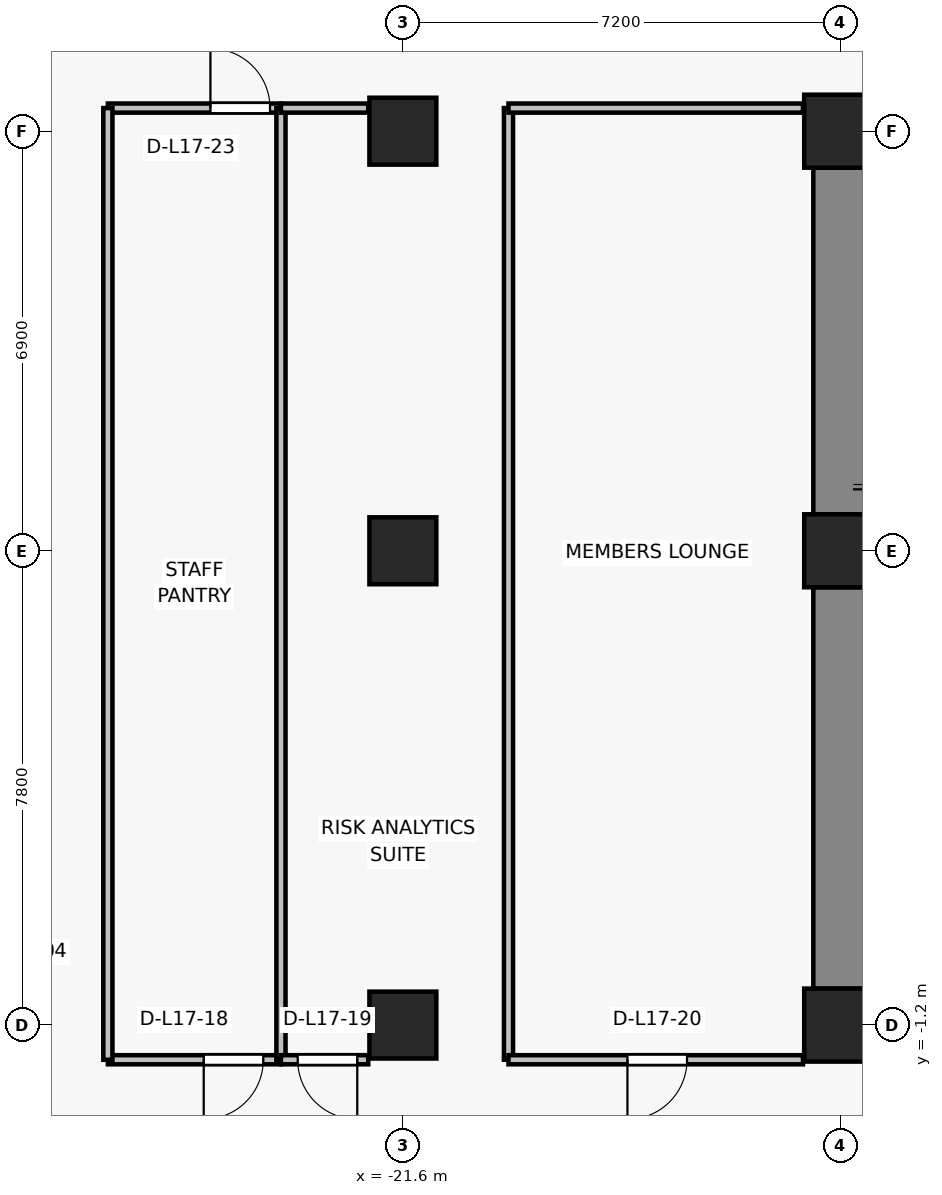
"""IFC4 building model, lengths in metres.
Left out: names, types, materials, properties, quantities, classifications, styles, units other than length and angle.
Written with IfcOpenShell. Run it as: python <this file> out.ifc"""

import sys

from ifc_helpers import new_model, si_unit, direction, frame, frame_2d, origin, origin_2d, place, context, subcontext, project, spatial, rectangle, extrude, source, transform, mapped, element, fill, save


model = new_model("IFC4")
c1 = context("Model", 3, precision=1e-05, world=origin(), true_north=direction((0.0, 1.0)))
c2 = subcontext(c1, "Body", "Model", "MODEL_VIEW")
j1 = project(units=[si_unit("LENGTHUNIT", "METRE"), si_unit("PLANEANGLEUNIT", "RADIAN")], contexts=[c1])
p1 = place(None, origin())
s1 = spatial("IfcSite", under=j1, at=p1, CompositionType="ELEMENT")
p2 = place(p1, origin())
s2 = spatial("IfcBuilding", under=s1, at=p2, CompositionType="ELEMENT")
p3 = place(p2, frame((0.0, 0.0, 63.7)))
s3 = spatial("IfcBuildingStorey", under=s2, at=p3, CompositionType="ELEMENT", Elevation=63.7)
for number, where, z_axis, x_axis in (
    (1, (-14.4, -1.2, 0.0), (0.0, 0.0, 1.0), (1.0, 0.0, 0.0)),
    (2, (-14.4, 6.6, 0.0), (0.0, 0.0, 1.0), (1.0, 0.0, 0.0)),
    (3, (-14.4, 13.5, 0.0), (0.0, 0.0, 1.0), (1.0, 0.0, 0.0)),
):
    element("IfcColumn", number, at=place(p3, frame(where, z_axis=z_axis, x_axis=x_axis)), inside=s3, PredefinedType="COLUMN", context=c2, shape_type="SweptSolid", body=[
        extrude(rectangle(XDim=1.2, YDim=1.2, at=origin_2d()), origin(), (0.0, 0.0, 1.0), 3.3),
    ])
for number, where, z_axis, x_axis in (
    (4, (-21.6, -1.2, 0.0), (0.0, 0.0, 1.0), (1.0, 0.0, 0.0)),
    (5, (-21.6, 6.6, 0.0), (0.0, 0.0, 1.0), (1.0, 0.0, 0.0)),
    (6, (-21.6, 13.5, 0.0), (0.0, 0.0, 1.0), (1.0, 0.0, 0.0)),
):
    element("IfcColumn", number, at=place(p3, frame(where, z_axis=z_axis, x_axis=x_axis)), inside=s3, PredefinedType="COLUMN", context=c2, shape_type="SweptSolid", body=[
        extrude(rectangle(XDim=1.1, YDim=1.1, at=origin_2d()), origin(), (0.0, 0.0, 1.0), 3.3),
    ])
p4 = place(p3, frame((-14.4, -0.6, 0.0), z_axis=(0.0, 0.0, 1.0), x_axis=(0.0, 1.0, 0.0)))
e7 = element("IfcWall", 7, at=p4, inside=s3, PredefinedType="SHEAR", context=c2, shape_type="SweptSolid", body=[
    extrude(rectangle(XDim=6.6, YDim=0.9, at=frame_2d((3.3, 0.0))), origin(), (0.0, 0.0, 1.0), 3.075),
])
p5 = place(p3, frame((-14.4, 7.2, 0.0), z_axis=(0.0, 0.0, 1.0), x_axis=(0.0, 1.0, 0.0)))
e8 = element("IfcWall", 8, at=p5, inside=s3, PredefinedType="SHEAR", context=c2, shape_type="SweptSolid", body=[
    extrude(rectangle(XDim=5.7, YDim=0.9, at=frame_2d((2.85, 0.0))), origin(), (0.0, 0.0, 1.0), 3.075),
])
p6 = place(p3, frame((-23.605, -1.77, 0.0), z_axis=(0.0, 0.0, 1.0), x_axis=(-1.0, 0.0, 0.0)))
e9 = element("IfcWall", 9, at=p6, inside=s3, PredefinedType="PARTITIONING", context=c2, shape_type="SweptSolid", body=[
    extrude(rectangle(XDim=2.846, YDim=0.15, at=frame_2d((1.423, 0.0))), origin(), (0.0, 0.0, 1.0), 3.075),
])
p7 = place(p6, frame((0.29, 0.0, 0.0)))
e10 = element("IfcOpeningElement", 10, at=p7, cuts=e9, PredefinedType="OPENING", context=c2, shape_type="SweptSolid", body=[
    extrude(rectangle(XDim=0.98, YDim=2.15, at=frame_2d((0.49, 1.075))), frame((0.0, 0.085, 0.0), z_axis=(0.0, -1.0, 0.0), x_axis=(1.0, 0.0, 0.0)), (0.0, 0.0, 1.0), 0.17),
])
p8 = place(p3, frame((-26.451, 13.88, 0.0), z_axis=(0.0, 0.0, 1.0), x_axis=(1.0, 0.0, 0.0)))
e11 = element("IfcWall", 11, at=p8, inside=s3, PredefinedType="PARTITIONING", context=c2, shape_type="SweptSolid", body=[
    extrude(rectangle(XDim=2.846, YDim=0.15, at=frame_2d((1.423, 0.0))), origin(), (0.0, 0.0, 1.0), 3.075),
])
p9 = place(p8, frame((1.686, 0.0, 0.0)))
e12 = element("IfcOpeningElement", 12, at=p9, cuts=e11, PredefinedType="OPENING", context=c2, shape_type="SweptSolid", body=[
    extrude(rectangle(XDim=0.98, YDim=2.15, at=frame_2d((0.49, 1.075))), frame((0.0, 0.085, 0.0), z_axis=(0.0, -1.0, 0.0), x_axis=(1.0, 0.0, 0.0)), (0.0, 0.0, 1.0), 0.17),
])
for number, where, z_axis, x_axis in (
    (13, (-26.451, -1.77, 0.0), (0.0, 0.0, 1.0), (0.0, 1.0, 0.0)),
    (14, (-23.605, 13.88, 0.0), (0.0, 0.0, 1.0), (0.0, -1.0, 0.0)),
):
    element("IfcWall", number, at=place(p3, frame(where, z_axis=z_axis, x_axis=x_axis)), inside=s3, PredefinedType="PARTITIONING", context=c2, shape_type="SweptSolid", body=[
        extrude(rectangle(XDim=15.65, YDim=0.15, at=frame_2d((7.825, 0.0))), origin(), (0.0, 0.0, 1.0), 2.465),
    ])
p10 = place(p3, frame((-22.17, -1.77, 0.0), z_axis=(0.0, 0.0, 1.0), x_axis=(-1.0, 0.0, 0.0)))
e15 = element("IfcWall", 15, at=p10, inside=s3, PredefinedType="PARTITIONING", context=c2, shape_type="SweptSolid", body=[
    extrude(rectangle(XDim=1.435, YDim=0.15, at=frame_2d((0.718, 0.0))), origin(), (0.0, 0.0, 1.0), 3.075),
])
p11 = place(p10, frame((0.18, 0.0, 0.0)))
e16 = element("IfcOpeningElement", 16, at=p11, cuts=e15, PredefinedType="OPENING", context=c2, shape_type="SweptSolid", body=[
    extrude(rectangle(XDim=0.98, YDim=2.15, at=frame_2d((0.49, 1.075))), frame((0.0, 0.085, 0.0), z_axis=(0.0, -1.0, 0.0), x_axis=(1.0, 0.0, 0.0)), (0.0, 0.0, 1.0), 0.17),
])
p12 = place(p3, frame((-23.605, 13.88, 0.0), z_axis=(0.0, 0.0, 1.0), x_axis=(1.0, 0.0, 0.0)))
e17 = element("IfcWall", 17, at=p12, inside=s3, PredefinedType="PARTITIONING", context=c2, shape_type="SweptSolid", body=[
    extrude(rectangle(XDim=1.435, YDim=0.15, at=frame_2d((0.718, 0.0))), origin(), (0.0, 0.0, 1.0), 3.075),
])
p13 = place(p3, frame((-19.863, 13.88, 0.0), z_axis=(0.0, 0.0, 1.0), x_axis=(0.0, -1.0, 0.0)))
e18 = element("IfcWall", 18, at=p13, inside=s3, PredefinedType="PARTITIONING", context=c2, shape_type="SweptSolid", body=[
    extrude(rectangle(XDim=15.65, YDim=0.15, at=frame_2d((7.825, 0.0))), origin(), (0.0, 0.0, 1.0), 2.465),
])
p14 = place(p3, frame((-15.02, -1.77, 0.0), z_axis=(0.0, 0.0, 1.0), x_axis=(-1.0, 0.0, 0.0)))
e19 = element("IfcWall", 19, at=p14, inside=s3, PredefinedType="PARTITIONING", context=c2, shape_type="SweptSolid", body=[
    extrude(rectangle(XDim=4.843, YDim=0.15, at=frame_2d((2.421, 0.0))), origin(), (0.0, 0.0, 1.0), 3.075),
])
p15 = place(p14, frame((1.907, 0.0, 0.0)))
e20 = element("IfcOpeningElement", 20, at=p15, cuts=e19, PredefinedType="OPENING", context=c2, shape_type="SweptSolid", body=[
    extrude(rectangle(XDim=0.98, YDim=2.15, at=frame_2d((0.49, 1.075))), frame((0.0, 0.085, 0.0), z_axis=(0.0, -1.0, 0.0), x_axis=(1.0, 0.0, 0.0)), (0.0, 0.0, 1.0), 0.17),
])
p16 = place(p3, frame((-19.863, 13.88, 0.0), z_axis=(0.0, 0.0, 1.0), x_axis=(1.0, 0.0, 0.0)))
e21 = element("IfcWall", 21, at=p16, inside=s3, PredefinedType="PARTITIONING", context=c2, shape_type="SweptSolid", body=[
    extrude(rectangle(XDim=4.843, YDim=0.15, at=frame_2d((2.421, 0.0))), origin(), (0.0, 0.0, 1.0), 3.075),
])
m1 = source(origin(), c2, "Body", "SweptSolid", [
    extrude(rectangle(XDim=0.98, YDim=2.15, at=frame_2d((0.49, 1.075))), frame((0.0, 0.025, 0.0), z_axis=(0.0, -1.0, 0.0), x_axis=(1.0, 0.0, 0.0)), (0.0, 0.0, 1.0), 0.05),
])
p17 = place(p7, origin())
e22 = element("IfcDoor", 22, at=p17, inside=s3, OperationType="SINGLE_SWING_RIGHT", PredefinedType="DOOR", context=c2, shape_type="MappedRepresentation", body=[
    mapped(m1, transform((0.0, 0.0, 0.0), x_axis=(1.0, 0.0, 0.0), y_axis=(0.0, 1.0, 0.0), z_axis=(0.0, 0.0, 1.0), scale=1.0)),
])
fill(e10, e22)
p18 = place(p11, origin())
e23 = element("IfcDoor", 23, at=p18, inside=s3, OperationType="SINGLE_SWING_LEFT", PredefinedType="DOOR", context=c2, shape_type="MappedRepresentation", body=[
    mapped(m1, transform((0.0, 0.0, 0.0), x_axis=(1.0, 0.0, 0.0), y_axis=(0.0, 1.0, 0.0), z_axis=(0.0, 0.0, 1.0), scale=1.0)),
])
fill(e16, e23)
p19 = place(p15, origin())
e24 = element("IfcDoor", 24, at=p19, inside=s3, OperationType="SINGLE_SWING_RIGHT", PredefinedType="DOOR", context=c2, shape_type="MappedRepresentation", body=[
    mapped(m1, transform((0.0, 0.0, 0.0), x_axis=(1.0, 0.0, 0.0), y_axis=(0.0, 1.0, 0.0), z_axis=(0.0, 0.0, 1.0), scale=1.0)),
])
fill(e20, e24)
p20 = place(p9, origin())
e25 = element("IfcDoor", 25, at=p20, inside=s3, OperationType="SINGLE_SWING_LEFT", PredefinedType="DOOR", context=c2, shape_type="MappedRepresentation", body=[
    mapped(m1, transform((0.0, 0.0, 0.0), x_axis=(1.0, 0.0, 0.0), y_axis=(0.0, 1.0, 0.0), z_axis=(0.0, 0.0, 1.0), scale=1.0)),
])
fill(e12, e25)
save(model, sys.argv[1])
